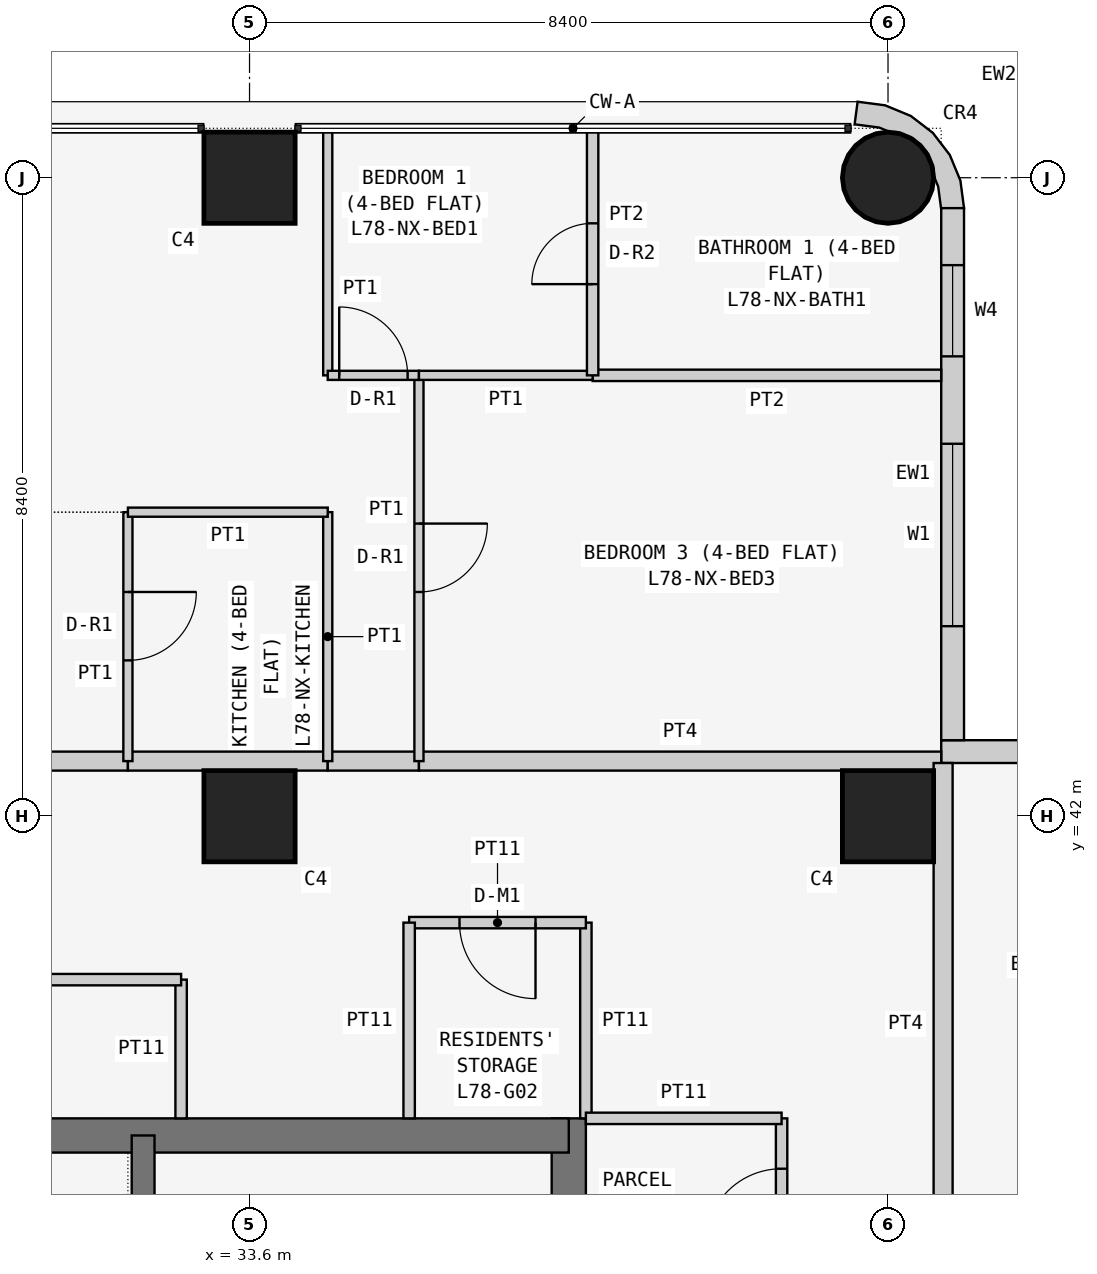
"""IFC4 building model, lengths in metres.
Left out: names, types, materials, properties, quantities, classifications, styles, units other than length and angle.
Written with IfcOpenShell. Run it as: python <this file> out.ifc"""

import sys

from ifc_helpers import new_model, si_unit, direction, frame, frame_2d, origin, origin_2d, place, context, subcontext, project, spatial, polyline, rectangle, circle, outline, extrude, element, fill, save


model = new_model("IFC4")
c1 = context("Model", 3, precision=1e-05, world=origin(), true_north=direction((0.0, 1.0)))
c2 = subcontext(c1, "Body", "Model", "MODEL_VIEW")
j1 = project(units=[si_unit("LENGTHUNIT", "METRE"), si_unit("PLANEANGLEUNIT", "RADIAN")], contexts=[c1])
p1 = place(None, origin())
s1 = spatial("IfcSite", under=j1, at=p1, CompositionType="ELEMENT")
p2 = place(p1, origin())
s2 = spatial("IfcBuilding", under=s1, at=p2, CompositionType="ELEMENT")
p3 = place(p2, frame((0.0, 0.0, 297.3)))
s3 = spatial("IfcBuildingStorey", under=s2, at=p3, CompositionType="ELEMENT", Elevation=297.3)
for number, where, z_axis, x_axis in (
    (1, (33.6, 42.0, 0.0), (0.0, 0.0, 1.0), (1.0, 0.0, 0.0)),
    (2, (33.6, 50.4, 0.0), (0.0, 0.0, 1.0), (1.0, 0.0, 0.0)),
    (3, (42.0, 42.0, 0.0), (0.0, 0.0, 1.0), (1.0, 0.0, 0.0)),
):
    element("IfcColumn", number, at=place(p3, frame(where, z_axis=z_axis, x_axis=x_axis)), inside=s3, PredefinedType="COLUMN", context=c2, shape_type="SweptSolid", body=[
        extrude(rectangle(XDim=1.2, YDim=1.2, at=origin_2d()), origin(), (0.0, 0.0, 1.0), 3.6),
    ])
p4 = place(p3, frame((42.0, 50.4, 0.0), z_axis=(0.0, 0.0, 1.0), x_axis=(1.0, 0.0, 0.0)))
e4 = element("IfcColumn", 4, at=p4, inside=s3, PredefinedType="COLUMN", context=c2, shape_type="SweptSolid", body=[
    extrude(circle(Radius=0.6, at=origin_2d()), origin(), (0.0, 0.0, 1.0), 3.6),
])
p5 = place(p3, frame((37.8, 21.0, 0.0), z_axis=(0.0, 0.0, 1.0), x_axis=(0.0, 1.0, 0.0)))
e5 = element("IfcWall", 5, at=p5, inside=s3, PredefinedType="SHEAR", context=c2, shape_type="SweptSolid", body=[
    extrude(rectangle(XDim=17.025, YDim=0.45, at=frame_2d((8.512, 0.0))), origin(), (0.0, 0.0, 1.0), 3.6),
])
p6 = place(p5, frame((5.2, 0.0, 0.0)))
e6 = element("IfcOpeningElement", 6, at=p6, cuts=e5, PredefinedType="OPENING", context=c2, shape_type="SweptSolid", body=[
    extrude(rectangle(XDim=1.2, YDim=2.1, at=frame_2d((0.6, 1.05))), frame((0.0, 0.235, 0.0), z_axis=(0.0, -1.0, 0.0), x_axis=(1.0, 0.0, 0.0)), (0.0, 0.0, 1.0), 0.47),
])
p7 = place(p3, frame((37.8, 37.8, 0.0), z_axis=(0.0, 0.0, 1.0), x_axis=(-1.0, 0.0, 0.0)))
e7 = element("IfcWall", 7, at=p7, inside=s3, PredefinedType="SHEAR", context=c2, shape_type="SweptSolid", body=[
    extrude(rectangle(XDim=17.025, YDim=0.45, at=frame_2d((8.513, 0.0))), origin(), (0.0, 0.0, 1.0), 3.6),
])
p8 = place(p3, frame((32.2, 29.25, 0.0), z_axis=(0.0, 0.0, 1.0), x_axis=(0.0, 1.0, 0.0)))
e8 = element("IfcWall", 8, at=p8, inside=s3, PredefinedType="SHEAR", context=c2, shape_type="SweptSolid", body=[
    extrude(rectangle(XDim=8.55, YDim=0.3, at=frame_2d((4.275, 0.0))), origin(), (0.0, 0.0, 1.0), 3.6),
])
p9 = place(p3, frame((50.0, 42.85, 0.0), z_axis=(0.0, 0.0, 1.0), x_axis=(-1.0, 0.0, 0.0)))
e9 = element("IfcWall", 9, at=p9, inside=s3, PredefinedType="SOLIDWALL", context=c2, shape_type="SweptSolid", body=[
    extrude(rectangle(XDim=7.3, YDim=0.3, at=frame_2d((3.65, 0.0))), origin(), (0.0, 0.0, 1.0), 3.35),
])
p10 = place(p9, frame((3.1, 0.0, 0.9)))
e10 = element("IfcOpeningElement", 10, at=p10, cuts=e9, PredefinedType="OPENING", context=c2, shape_type="SweptSolid", body=[
    extrude(rectangle(XDim=2.4, YDim=1.5, at=frame_2d((1.2, 0.75))), frame((0.0, 0.16, 0.0), z_axis=(0.0, -1.0, 0.0), x_axis=(1.0, 0.0, 0.0)), (0.0, 0.0, 1.0), 0.32),
])
p11 = place(p9, frame((0.75, 0.0, 0.9)))
e11 = element("IfcOpeningElement", 11, at=p11, cuts=e9, PredefinedType="OPENING", context=c2, shape_type="SweptSolid", body=[
    extrude(rectangle(XDim=1.2, YDim=1.5, at=frame_2d((0.6, 0.75))), frame((0.0, 0.16, 0.0), z_axis=(0.0, -1.0, 0.0), x_axis=(1.0, 0.0, 0.0)), (0.0, 0.0, 1.0), 0.32),
])
p12 = place(p3, frame((42.85, 43.0, 0.0), z_axis=(0.0, 0.0, 1.0), x_axis=(0.0, 1.0, 0.0)))
e12 = element("IfcWall", 12, at=p12, inside=s3, PredefinedType="SOLIDWALL", context=c2, shape_type="SweptSolid", body=[
    extrude(rectangle(XDim=7.0, YDim=0.3, at=frame_2d((3.5, 0.0))), origin(), (0.0, 0.0, 1.0), 3.35),
])
p13 = place(p12, frame((1.5, 0.0, 0.9)))
e13 = element("IfcOpeningElement", 13, at=p13, cuts=e12, PredefinedType="OPENING", context=c2, shape_type="SweptSolid", body=[
    extrude(rectangle(XDim=2.4, YDim=1.5, at=frame_2d((1.2, 0.75))), frame((0.0, 0.16, 0.0), z_axis=(0.0, -1.0, 0.0), x_axis=(1.0, 0.0, 0.0)), (0.0, 0.0, 1.0), 0.32),
])
p14 = place(p12, frame((5.05, 0.0, 0.9)))
e14 = element("IfcOpeningElement", 14, at=p14, cuts=e12, PredefinedType="OPENING", context=c2, shape_type="SweptSolid", body=[
    extrude(rectangle(XDim=1.2, YDim=1.5, at=frame_2d((0.6, 0.75))), frame((0.0, 0.16, 0.0), z_axis=(0.0, -1.0, 0.0), x_axis=(1.0, 0.0, 0.0)), (0.0, 0.0, 1.0), 0.32),
])
p15 = place(p3, frame((42.576, 50.038, 0.0), z_axis=(0.0, 0.0, 1.0), x_axis=(0.707106781187, 0.707106781187, 0.0)))
e15 = element("IfcWall", 15, at=p15, inside=s3, PredefinedType="SOLIDWALL", context=c2, shape_type="SweptSolid", body=[
    extrude(outline(polyline([(0.233, 0.114), (0.047, -0.129), (0.033, -0.143), (0.273, -0.327), (0.495, -0.037), (0.635, 0.3), (0.683, 0.663), (0.635, 1.025), (0.495, 1.363), (0.273, 1.653), (0.033, 1.469), (0.047, 1.455), (0.233, 1.212), (0.292, 1.069), (0.358, 1.003), (0.449, 0.782), (0.449, 0.543), (0.358, 0.322), (0.292, 0.257), (0.233, 0.114)])), origin(), (0.0, 0.0, 1.0), 3.35),
])
p16 = place(p3, frame((32.7, 38.025, 0.0), z_axis=(0.0, 0.0, 1.0), x_axis=(0.0, 1.0, 0.0)))
e16 = element("IfcWall", 16, at=p16, inside=s3, PredefinedType="PARTITIONING", context=c2, shape_type="SweptSolid", body=[
    extrude(rectangle(XDim=1.825, YDim=0.15, at=frame_2d((0.913, 0.0))), origin(), (0.0, 0.0, 1.0), 3.35),
])
p17 = place(p3, frame((32.7, 39.85, 0.0), z_axis=(0.0, 0.0, 1.0), x_axis=(-1.0, 0.0, 0.0)))
e17 = element("IfcWall", 17, at=p17, inside=s3, PredefinedType="PARTITIONING", context=c2, shape_type="SweptSolid", body=[
    extrude(rectangle(XDim=11.925, YDim=0.15, at=frame_2d((5.962, 0.0))), origin(), (0.0, 0.0, 1.0), 3.35),
])
p18 = place(p17, frame((2.8, 0.0, 0.0)))
e18 = element("IfcOpeningElement", 18, at=p18, cuts=e17, PredefinedType="OPENING", context=c2, shape_type="SweptSolid", body=[
    extrude(rectangle(XDim=1.0, YDim=2.1, at=frame_2d((0.5, 1.05))), frame((0.0, 0.085, 0.0), z_axis=(0.0, -1.0, 0.0), x_axis=(1.0, 0.0, 0.0)), (0.0, 0.0, 1.0), 0.17),
])
p19 = place(p3, frame((38.025, 38.025, 0.0), z_axis=(0.0, 0.0, 1.0), x_axis=(0.0, 1.0, 0.0)))
e19 = element("IfcWall", 19, at=p19, inside=s3, PredefinedType="PARTITIONING", context=c2, shape_type="SweptSolid", body=[
    extrude(rectangle(XDim=2.575, YDim=0.15, at=frame_2d((1.288, 0.0))), origin(), (0.0, 0.0, 1.0), 3.35),
])
p20 = place(p3, frame((38.025, 40.6, 0.0), z_axis=(0.0, 0.0, 1.0), x_axis=(-1.0, 0.0, 0.0)))
e20 = element("IfcWall", 20, at=p20, inside=s3, PredefinedType="PARTITIONING", context=c2, shape_type="SweptSolid", body=[
    extrude(rectangle(XDim=2.325, YDim=0.15, at=frame_2d((1.163, 0.0))), origin(), (0.0, 0.0, 1.0), 3.35),
])
p21 = place(p20, frame((0.663, 0.0, 0.0)))
e21 = element("IfcOpeningElement", 21, at=p21, cuts=e20, PredefinedType="OPENING", context=c2, shape_type="SweptSolid", body=[
    extrude(rectangle(XDim=1.0, YDim=2.1, at=frame_2d((0.5, 1.05))), frame((0.0, 0.085, 0.0), z_axis=(0.0, -1.0, 0.0), x_axis=(1.0, 0.0, 0.0)), (0.0, 0.0, 1.0), 0.17),
])
p22 = place(p3, frame((35.7, 40.6, 0.0), z_axis=(0.0, 0.0, 1.0), x_axis=(0.0, -1.0, 0.0)))
e22 = element("IfcWall", 22, at=p22, inside=s3, PredefinedType="PARTITIONING", context=c2, shape_type="SweptSolid", body=[
    extrude(rectangle(XDim=2.575, YDim=0.15, at=frame_2d((1.288, 0.0))), origin(), (0.0, 0.0, 1.0), 3.35),
])
p23 = place(p3, frame((40.6, 35.7, 0.0), z_axis=(0.0, 0.0, 1.0), x_axis=(0.0, 1.0, 0.0)))
e23 = element("IfcWall", 23, at=p23, inside=s3, PredefinedType="PARTITIONING", context=c2, shape_type="SweptSolid", body=[
    extrude(rectangle(XDim=2.325, YDim=0.15, at=frame_2d((1.163, 0.0))), origin(), (0.0, 0.0, 1.0), 3.35),
])
p24 = place(p23, frame((0.663, 0.0, 0.0)))
e24 = element("IfcOpeningElement", 24, at=p24, cuts=e23, PredefinedType="OPENING", context=c2, shape_type="SweptSolid", body=[
    extrude(rectangle(XDim=1.0, YDim=2.1, at=frame_2d((0.5, 1.05))), frame((0.0, 0.085, 0.0), z_axis=(0.0, -1.0, 0.0), x_axis=(1.0, 0.0, 0.0)), (0.0, 0.0, 1.0), 0.17),
])
p25 = place(p3, frame((40.6, 38.025, 0.0), z_axis=(0.0, 0.0, 1.0), x_axis=(-1.0, 0.0, 0.0)))
e25 = element("IfcWall", 25, at=p25, inside=s3, PredefinedType="PARTITIONING", context=c2, shape_type="SweptSolid", body=[
    extrude(rectangle(XDim=2.575, YDim=0.15, at=frame_2d((1.288, 0.0))), origin(), (0.0, 0.0, 1.0), 3.35),
])
p26 = place(p3, frame((26.8, 42.725, 0.0), z_axis=(0.0, 0.0, 1.0), x_axis=(1.0, 0.0, 0.0)))
e26 = element("IfcWall", 26, at=p26, inside=s3, PredefinedType="PARTITIONING", context=c2, shape_type="SweptSolid", body=[
    extrude(rectangle(XDim=5.2, YDim=0.25, at=frame_2d((2.6, 0.0))), origin(), (0.0, 0.0, 1.0), 3.35),
])
p27 = place(p26, frame((2.1, 0.0, 0.0)))
e27 = element("IfcOpeningElement", 27, at=p27, cuts=e26, PredefinedType="OPENING", context=c2, shape_type="SweptSolid", body=[
    extrude(rectangle(XDim=1.0, YDim=2.1, at=frame_2d((0.5, 1.05))), frame((0.0, 0.135, 0.0), z_axis=(0.0, -1.0, 0.0), x_axis=(1.0, 0.0, 0.0)), (0.0, 0.0, 1.0), 0.27),
])
p28 = place(p3, frame((32.0, 42.725, 0.0), z_axis=(0.0, 0.0, 1.0), x_axis=(1.0, 0.0, 0.0)))
e28 = element("IfcWall", 28, at=p28, inside=s3, PredefinedType="PARTITIONING", context=c2, shape_type="SweptSolid", body=[
    extrude(rectangle(XDim=2.629, YDim=0.25, at=frame_2d((1.314, 0.0))), origin(), (0.0, 0.0, 1.0), 3.35),
])
p29 = place(p3, frame((34.629, 42.725, 0.0), z_axis=(0.0, 0.0, 1.0), x_axis=(1.0, 0.0, 0.0)))
e29 = element("IfcWall", 29, at=p29, inside=s3, PredefinedType="PARTITIONING", context=c2, shape_type="SweptSolid", body=[
    extrude(rectangle(XDim=1.2, YDim=0.25, at=frame_2d((0.6, 0.0))), origin(), (0.0, 0.0, 1.0), 3.35),
])
for number, where, z_axis, x_axis in (
    (30, (35.829, 42.725, 0.0), (0.0, 0.0, 1.0), (1.0, 0.0, 0.0)),
    (31, (42.725, 42.7, 0.0), (0.0, 0.0, 1.0), (0.0, -1.0, 0.0)),
):
    element("IfcWall", number, at=place(p3, frame(where, z_axis=z_axis, x_axis=x_axis)), inside=s3, PredefinedType="PARTITIONING", context=c2, shape_type="SweptSolid", body=[
        extrude(rectangle(XDim=6.871, YDim=0.25, at=frame_2d((3.436, 0.0))), origin(), (0.0, 0.0, 1.0), 3.35),
    ])
p30 = place(p3, frame((32.0, 42.725, 0.0), z_axis=(0.0, 0.0, 1.0), x_axis=(0.0, 1.0, 0.0)))
e32 = element("IfcWall", 32, at=p30, inside=s3, PredefinedType="PARTITIONING", context=c2, shape_type="SweptSolid", body=[
    extrude(rectangle(XDim=3.275, YDim=0.12, at=frame_2d((1.637, 0.0))), origin(), (0.0, 0.0, 1.0), 3.35),
])
p31 = place(p30, frame((1.325, 0.0, 0.0)))
e33 = element("IfcOpeningElement", 33, at=p31, cuts=e32, PredefinedType="OPENING", context=c2, shape_type="SweptSolid", body=[
    extrude(rectangle(XDim=0.9, YDim=2.1, at=frame_2d((0.45, 1.05))), frame((0.0, 0.07, 0.0), z_axis=(0.0, -1.0, 0.0), x_axis=(1.0, 0.0, 0.0)), (0.0, 0.0, 1.0), 0.14),
])
p32 = place(p3, frame((34.629, 42.725, 0.0), z_axis=(0.0, 0.0, 1.0), x_axis=(0.0, 1.0, 0.0)))
e34 = element("IfcWall", 34, at=p32, inside=s3, PredefinedType="PARTITIONING", context=c2, shape_type="SweptSolid", body=[
    extrude(rectangle(XDim=3.275, YDim=0.12, at=frame_2d((1.637, 0.0))), origin(), (0.0, 0.0, 1.0), 3.35),
])
p33 = place(p3, frame((34.629, 46.0, 0.0), z_axis=(0.0, 0.0, 1.0), x_axis=(-1.0, 0.0, 0.0)))
e35 = element("IfcWall", 35, at=p33, inside=s3, PredefinedType="PARTITIONING", context=c2, shape_type="SweptSolid", body=[
    extrude(rectangle(XDim=2.629, YDim=0.12, at=frame_2d((1.314, 0.0))), origin(), (0.0, 0.0, 1.0), 3.35),
])
p34 = place(p3, frame((35.829, 47.8, 0.0), z_axis=(0.0, 0.0, 1.0), x_axis=(0.0, -1.0, 0.0)))
e36 = element("IfcWall", 36, at=p34, inside=s3, PredefinedType="PARTITIONING", context=c2, shape_type="SweptSolid", body=[
    extrude(rectangle(XDim=5.075, YDim=0.12, at=frame_2d((2.538, 0.0))), origin(), (0.0, 0.0, 1.0), 3.35),
])
p35 = place(p34, frame((1.95, 0.0, 0.0)))
e37 = element("IfcOpeningElement", 37, at=p35, cuts=e36, PredefinedType="OPENING", context=c2, shape_type="SweptSolid", body=[
    extrude(rectangle(XDim=0.9, YDim=2.1, at=frame_2d((0.45, 1.05))), frame((0.0, 0.07, 0.0), z_axis=(0.0, -1.0, 0.0), x_axis=(1.0, 0.0, 0.0)), (0.0, 0.0, 1.0), 0.14),
])
p36 = place(p3, frame((34.629, 51.05, 0.0), z_axis=(0.0, 0.0, 1.0), x_axis=(0.0, -1.0, 0.0)))
e38 = element("IfcWall", 38, at=p36, inside=s3, PredefinedType="PARTITIONING", context=c2, shape_type="SweptSolid", body=[
    extrude(rectangle(XDim=3.25, YDim=0.12, at=frame_2d((1.625, 0.0))), origin(), (0.0, 0.0, 1.0), 3.35),
])
p37 = place(p3, frame((34.629, 47.8, 0.0), z_axis=(0.0, 0.0, 1.0), x_axis=(1.0, 0.0, 0.0)))
e39 = element("IfcWall", 39, at=p37, inside=s3, PredefinedType="PARTITIONING", context=c2, shape_type="SweptSolid", body=[
    extrude(rectangle(XDim=1.2, YDim=0.12, at=frame_2d((0.6, 0.0))), origin(), (0.0, 0.0, 1.0), 3.35),
])
p38 = place(p37, frame((0.151, 0.0, 0.0)))
e40 = element("IfcOpeningElement", 40, at=p38, cuts=e39, PredefinedType="OPENING", context=c2, shape_type="SweptSolid", body=[
    extrude(rectangle(XDim=0.9, YDim=2.1, at=frame_2d((0.45, 1.05))), frame((0.0, 0.07, 0.0), z_axis=(0.0, -1.0, 0.0), x_axis=(1.0, 0.0, 0.0)), (0.0, 0.0, 1.0), 0.14),
])
p39 = place(p3, frame((42.7, 47.8, 0.0), z_axis=(0.0, 0.0, 1.0), x_axis=(-1.0, 0.0, 0.0)))
e41 = element("IfcWall", 41, at=p39, inside=s3, PredefinedType="PARTITIONING", context=c2, shape_type="SweptSolid", body=[
    extrude(rectangle(XDim=4.586, YDim=0.15, at=frame_2d((2.293, 0.0))), origin(), (0.0, 0.0, 1.0), 3.35),
])
p40 = place(p3, frame((38.114, 47.8, 0.0), z_axis=(0.0, 0.0, 1.0), x_axis=(-1.0, 0.0, 0.0)))
e42 = element("IfcWall", 42, at=p40, inside=s3, PredefinedType="PARTITIONING", context=c2, shape_type="SweptSolid", body=[
    extrude(rectangle(XDim=2.285, YDim=0.12, at=frame_2d((1.143, 0.0))), origin(), (0.0, 0.0, 1.0), 3.35),
])
p41 = place(p3, frame((38.114, 51.05, 0.0), z_axis=(0.0, 0.0, 1.0), x_axis=(0.0, -1.0, 0.0)))
e43 = element("IfcWall", 43, at=p41, inside=s3, PredefinedType="PARTITIONING", context=c2, shape_type="SweptSolid", body=[
    extrude(rectangle(XDim=3.25, YDim=0.15, at=frame_2d((1.625, 0.0))), origin(), (0.0, 0.0, 1.0), 3.35),
])
p42 = place(p41, frame((1.25, 0.0, 0.0)))
e44 = element("IfcOpeningElement", 44, at=p42, cuts=e43, PredefinedType="OPENING", context=c2, shape_type="SweptSolid", body=[
    extrude(rectangle(XDim=0.8, YDim=2.1, at=frame_2d((0.4, 1.05))), frame((0.0, 0.085, 0.0), z_axis=(0.0, -1.0, 0.0), x_axis=(1.0, 0.0, 0.0)), (0.0, 0.0, 1.0), 0.17),
])
p43 = place(p13, origin())
e45 = element("IfcWindow", 45, at=p43, inside=s3, PartitioningType="SINGLE_PANEL", PredefinedType="WINDOW", context=c2, shape_type="SweptSolid", body=[
    extrude(rectangle(XDim=2.4, YDim=1.5, at=frame_2d((1.2, 0.75))), frame((0.0, 0.03, 0.0), z_axis=(0.0, -1.0, 0.0), x_axis=(1.0, 0.0, 0.0)), (0.0, 0.0, 1.0), 0.06),
])
fill(e13, e45)
p44 = place(p14, origin())
e46 = element("IfcWindow", 46, at=p44, inside=s3, PartitioningType="SINGLE_PANEL", PredefinedType="WINDOW", context=c2, shape_type="SweptSolid", body=[
    extrude(rectangle(XDim=1.2, YDim=1.5, at=frame_2d((0.6, 0.75))), frame((0.0, 0.03, 0.0), z_axis=(0.0, -1.0, 0.0), x_axis=(1.0, 0.0, 0.0)), (0.0, 0.0, 1.0), 0.06),
])
fill(e14, e46)
p45 = place(p21, origin())
e47 = element("IfcDoor", 47, at=p45, inside=s3, OperationType="SINGLE_SWING_LEFT", PredefinedType="DOOR", context=c2, shape_type="SweptSolid", body=[
    extrude(rectangle(XDim=1.0, YDim=2.1, at=frame_2d((0.5, 1.05))), frame((0.0, 0.025, 0.0), z_axis=(0.0, -1.0, 0.0), x_axis=(1.0, 0.0, 0.0)), (0.0, 0.0, 1.0), 0.05),
])
fill(e21, e47)
p46 = place(p24, origin())
e48 = element("IfcDoor", 48, at=p46, inside=s3, OperationType="SINGLE_SWING_LEFT", PredefinedType="DOOR", context=c2, shape_type="SweptSolid", body=[
    extrude(rectangle(XDim=1.0, YDim=2.1, at=frame_2d((0.5, 1.05))), frame((0.0, 0.025, 0.0), z_axis=(0.0, -1.0, 0.0), x_axis=(1.0, 0.0, 0.0)), (0.0, 0.0, 1.0), 0.05),
])
fill(e24, e48)
p47 = place(p31, frame((0.9, 0.0, 0.0), z_axis=(0.0, 0.0, 1.0), x_axis=(-1.0, 0.0, 0.0)))
e49 = element("IfcDoor", 49, at=p47, inside=s3, OperationType="SINGLE_SWING_LEFT", PredefinedType="DOOR", context=c2, shape_type="SweptSolid", body=[
    extrude(rectangle(XDim=0.9, YDim=2.1, at=frame_2d((0.45, 1.05))), frame((0.0, 0.025, 0.0), z_axis=(0.0, -1.0, 0.0), x_axis=(1.0, 0.0, 0.0)), (0.0, 0.0, 1.0), 0.05),
])
fill(e33, e49)
p48 = place(p35, origin())
e50 = element("IfcDoor", 50, at=p48, inside=s3, OperationType="SINGLE_SWING_LEFT", PredefinedType="DOOR", context=c2, shape_type="SweptSolid", body=[
    extrude(rectangle(XDim=0.9, YDim=2.1, at=frame_2d((0.45, 1.05))), frame((0.0, 0.025, 0.0), z_axis=(0.0, -1.0, 0.0), x_axis=(1.0, 0.0, 0.0)), (0.0, 0.0, 1.0), 0.05),
])
fill(e37, e50)
p49 = place(p38, origin())
e51 = element("IfcDoor", 51, at=p49, inside=s3, OperationType="SINGLE_SWING_LEFT", PredefinedType="DOOR", context=c2, shape_type="SweptSolid", body=[
    extrude(rectangle(XDim=0.9, YDim=2.1, at=frame_2d((0.45, 1.05))), frame((0.0, 0.025, 0.0), z_axis=(0.0, -1.0, 0.0), x_axis=(1.0, 0.0, 0.0)), (0.0, 0.0, 1.0), 0.05),
])
fill(e40, e51)
p50 = place(p42, frame((0.8, 0.0, 0.0), z_axis=(0.0, 0.0, 1.0), x_axis=(-1.0, 0.0, 0.0)))
e52 = element("IfcDoor", 52, at=p50, inside=s3, OperationType="SINGLE_SWING_LEFT", PredefinedType="DOOR", context=c2, shape_type="SweptSolid", body=[
    extrude(rectangle(XDim=0.8, YDim=2.1, at=frame_2d((0.4, 1.05))), frame((0.0, 0.025, 0.0), z_axis=(0.0, -1.0, 0.0), x_axis=(1.0, 0.0, 0.0)), (0.0, 0.0, 1.0), 0.05),
])
fill(e44, e52)
save(model, sys.argv[1])
